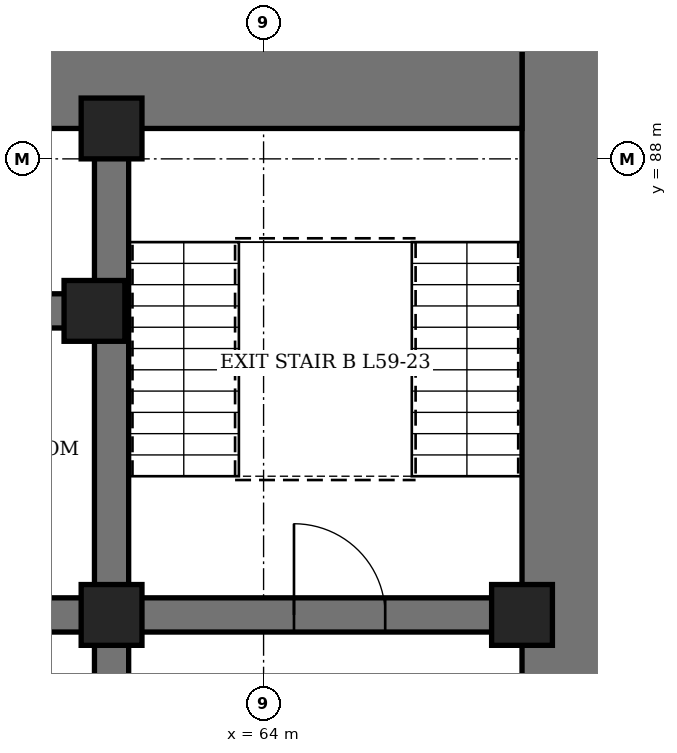
"""IFC4 building model, lengths in metres.
Left out: names, types, materials, properties, quantities, classifications, styles, units other than length and angle.
Written with IfcOpenShell. Run it as: python <this file> out.ifc"""

import sys

from ifc_helpers import new_model, si_unit, direction, frame, frame_2d, origin, origin_2d, place, context, subcontext, project, spatial, rectangle, hollow_rectangle, extrude, element, fill, save


model = new_model("IFC4")
c1 = context("Model", 3, precision=1e-05, world=origin(), true_north=direction((0.0, 1.0)))
c2 = subcontext(c1, "Body", "Model", "MODEL_VIEW")
j1 = project(units=[si_unit("LENGTHUNIT", "METRE"), si_unit("PLANEANGLEUNIT", "RADIAN")], contexts=[c1])
p1 = place(None, origin())
s1 = spatial("IfcSite", under=j1, at=p1, CompositionType="ELEMENT")
p2 = place(p1, origin())
s2 = spatial("IfcBuilding", under=s1, at=p2, CompositionType="ELEMENT")
p3 = place(p2, frame((0.0, 0.0, 262.9)))
s3 = spatial("IfcBuildingStorey", under=s2, at=p3, CompositionType="ELEMENT", Elevation=262.9)
p4 = place(p3, frame((68.0, 70.4, 0.0), z_axis=(0.0, 0.0, 1.0), x_axis=(0.0, 1.0, 0.0)))
e1 = element("IfcWall", 1, at=p4, inside=s3, PredefinedType="SHEAR", context=c2, shape_type="SweptSolid", body=[
    extrude(rectangle(XDim=19.2, YDim=1.2, at=frame_2d((9.6, 0.0))), origin(), (0.0, 0.0, 1.0), 4.2),
])
p5 = place(p4, frame((8.6, 0.0, 0.0)))
e2 = element("IfcOpeningElement", 2, at=p5, cuts=e1, PredefinedType="OPENING", context=c2, shape_type="SweptSolid", body=[
    extrude(rectangle(XDim=2.0, YDim=2.4, at=frame_2d((1.0, 1.2))), frame((0.0, 0.61, 0.0), z_axis=(0.0, -1.0, 0.0), x_axis=(1.0, 0.0, 0.0)), (0.0, 0.0, 1.0), 1.22),
])
p6 = place(p3, frame((44.6, 89.0, 0.0), z_axis=(0.0, 0.0, 1.0), x_axis=(1.0, 0.0, 0.0)))
e3 = element("IfcWall", 3, at=p6, inside=s3, PredefinedType="SHEAR", context=c2, shape_type="SweptSolid", body=[
    extrude(rectangle(XDim=22.8, YDim=1.2, at=frame_2d((11.4, 0.0))), origin(), (0.0, 0.0, 1.0), 4.2),
])
p7 = place(p6, frame((6.325, 0.0, 0.0)))
e4 = element("IfcOpeningElement", 4, at=p7, cuts=e3, PredefinedType="OPENING", context=c2, shape_type="SweptSolid", body=[
    extrude(rectangle(XDim=1.0, YDim=2.1, at=frame_2d((0.5, 1.05))), frame((0.0, 0.61, 0.0), z_axis=(0.0, -1.0, 0.0), x_axis=(1.0, 0.0, 0.0)), (0.0, 0.0, 1.0), 1.22),
])
p8 = place(p6, frame((9.25, 0.0, 0.0)))
e5 = element("IfcOpeningElement", 5, at=p8, cuts=e3, PredefinedType="OPENING", context=c2, shape_type="SweptSolid", body=[
    extrude(rectangle(XDim=0.9, YDim=2.1, at=frame_2d((0.45, 1.05))), frame((0.0, 0.61, 0.0), z_axis=(0.0, -1.0, 0.0), x_axis=(1.0, 0.0, 0.0)), (0.0, 0.0, 1.0), 1.22),
])
p9 = place(p6, frame((13.012, 0.0, 0.0)))
e6 = element("IfcOpeningElement", 6, at=p9, cuts=e3, PredefinedType="OPENING", context=c2, shape_type="SweptSolid", body=[
    extrude(rectangle(XDim=0.9, YDim=2.1, at=frame_2d((0.45, 1.05))), frame((0.0, 0.61, 0.0), z_axis=(0.0, -1.0, 0.0), x_axis=(1.0, 0.0, 0.0)), (0.0, 0.0, 1.0), 1.22),
])
p10 = place(p3, frame((62.0, 71.6, 0.0), z_axis=(0.0, 0.0, 1.0), x_axis=(0.0, 1.0, 0.0)))
e7 = element("IfcWall", 7, at=p10, inside=s3, PredefinedType="SHEAR", context=c2, shape_type="SweptSolid", body=[
    extrude(rectangle(XDim=16.8, YDim=0.45, at=frame_2d((8.4, 0.0))), origin(), (0.0, 0.0, 1.0), 4.2),
])
p11 = place(p10, frame((7.5, 0.0, 0.0)))
e8 = element("IfcOpeningElement", 8, at=p11, cuts=e7, PredefinedType="OPENING", context=c2, shape_type="SweptSolid", body=[
    extrude(rectangle(XDim=1.8, YDim=2.4, at=frame_2d((0.9, 1.2))), frame((0.0, 0.235, 0.0), z_axis=(0.0, -1.0, 0.0), x_axis=(1.0, 0.0, 0.0)), (0.0, 0.0, 1.0), 0.47),
])
p12 = place(p3, frame((62.225, 82.0, 0.0), z_axis=(0.0, 0.0, 1.0), x_axis=(1.0, 0.0, 0.0)))
e9 = element("IfcWall", 9, at=p12, inside=s3, PredefinedType="SHEAR", context=c2, shape_type="SweptSolid", body=[
    extrude(rectangle(XDim=5.175, YDim=0.45, at=frame_2d((2.587, 0.0))), origin(), (0.0, 0.0, 1.0), 4.2),
])
p13 = place(p12, frame((2.175, 0.0, 0.0)))
e10 = element("IfcOpeningElement", 10, at=p13, cuts=e9, PredefinedType="OPENING", context=c2, shape_type="SweptSolid", body=[
    extrude(rectangle(XDim=1.2, YDim=2.1, at=frame_2d((0.6, 1.05))), frame((0.0, 0.235, 0.0), z_axis=(0.0, -1.0, 0.0), x_axis=(1.0, 0.0, 0.0)), (0.0, 0.0, 1.0), 0.47),
])
p14 = place(p3, frame((50.225, 82.0, 0.0), z_axis=(0.0, 0.0, 1.0), x_axis=(1.0, 0.0, 0.0)))
e11 = element("IfcWall", 11, at=p14, inside=s3, PredefinedType="SHEAR", context=c2, shape_type="SweptSolid", body=[
    extrude(rectangle(XDim=11.55, YDim=0.45, at=frame_2d((5.775, 0.0))), origin(), (0.0, 0.0, 1.0), 4.2),
])
p15 = place(p14, frame((0.825, 0.0, 0.0)))
e12 = element("IfcOpeningElement", 12, at=p15, cuts=e11, PredefinedType="OPENING", context=c2, shape_type="SweptSolid", body=[
    extrude(rectangle(XDim=0.9, YDim=2.1, at=frame_2d((0.45, 1.05))), frame((0.0, 0.235, 0.0), z_axis=(0.0, -1.0, 0.0), x_axis=(1.0, 0.0, 0.0)), (0.0, 0.0, 1.0), 0.47),
])
p16 = place(p14, frame((3.825, 0.0, 0.0)))
e13 = element("IfcOpeningElement", 13, at=p16, cuts=e11, PredefinedType="OPENING", context=c2, shape_type="SweptSolid", body=[
    extrude(rectangle(XDim=0.9, YDim=2.1, at=frame_2d((0.45, 1.05))), frame((0.0, 0.235, 0.0), z_axis=(0.0, -1.0, 0.0), x_axis=(1.0, 0.0, 0.0)), (0.0, 0.0, 1.0), 0.47),
])
p17 = place(p14, frame((6.825, 0.0, 0.0)))
e14 = element("IfcOpeningElement", 14, at=p17, cuts=e11, PredefinedType="OPENING", context=c2, shape_type="SweptSolid", body=[
    extrude(rectangle(XDim=0.9, YDim=2.1, at=frame_2d((0.45, 1.05))), frame((0.0, 0.235, 0.0), z_axis=(0.0, -1.0, 0.0), x_axis=(1.0, 0.0, 0.0)), (0.0, 0.0, 1.0), 0.47),
])
p18 = place(p14, frame((9.825, 0.0, 0.0)))
e15 = element("IfcOpeningElement", 15, at=p18, cuts=e11, PredefinedType="OPENING", context=c2, shape_type="SweptSolid", body=[
    extrude(rectangle(XDim=0.9, YDim=2.1, at=frame_2d((0.45, 1.05))), frame((0.0, 0.235, 0.0), z_axis=(0.0, -1.0, 0.0), x_axis=(1.0, 0.0, 0.0)), (0.0, 0.0, 1.0), 0.47),
])
p19 = place(p3, frame((50.225, 86.0, 0.0), z_axis=(0.0, 0.0, 1.0), x_axis=(1.0, 0.0, 0.0)))
e16 = element("IfcWall", 16, at=p19, inside=s3, PredefinedType="SHEAR", context=c2, shape_type="SweptSolid", body=[
    extrude(rectangle(XDim=11.55, YDim=0.45, at=frame_2d((5.775, 0.0))), origin(), (0.0, 0.0, 1.0), 4.2),
])
for number, where, z_axis, x_axis in (
    (17, (61.775, 86.0, 0.0), (0.0, 0.0, 1.0), (1.0, 0.0, 0.0)),
    (18, (62.0, 82.0, 0.0), (0.0, 0.0, 1.0), (1.0, 0.0, 0.0)),
    (19, (62.0, 88.4, 0.0), (0.0, 0.0, 1.0), (1.0, 0.0, 0.0)),
    (20, (67.4, 82.0, 0.0), (0.0, 0.0, 1.0), (1.0, 0.0, 0.0)),
):
    element("IfcColumn", number, at=place(p3, frame(where, z_axis=z_axis, x_axis=x_axis)), inside=s3, PredefinedType="COLUMN", context=c2, shape_type="SweptSolid", body=[
        extrude(hollow_rectangle(XDim=0.8, YDim=0.8, WallThickness=0.1, at=origin_2d()), origin(), (0.0, 0.0, 1.0), 4.2),
    ])
p20 = place(p13, origin())
e21 = element("IfcDoor", 21, at=p20, inside=s3, OperationType="SINGLE_SWING_LEFT", PredefinedType="DOOR", context=c2, shape_type="SweptSolid", body=[
    extrude(rectangle(XDim=1.2, YDim=2.1, at=frame_2d((0.6, 1.05))), frame((0.0, 0.225, 0.0), z_axis=(0.0, -1.0, 0.0), x_axis=(1.0, 0.0, 0.0)), (0.0, 0.0, 1.0), 0.449),
])
fill(e10, e21)
save(model, sys.argv[1])
